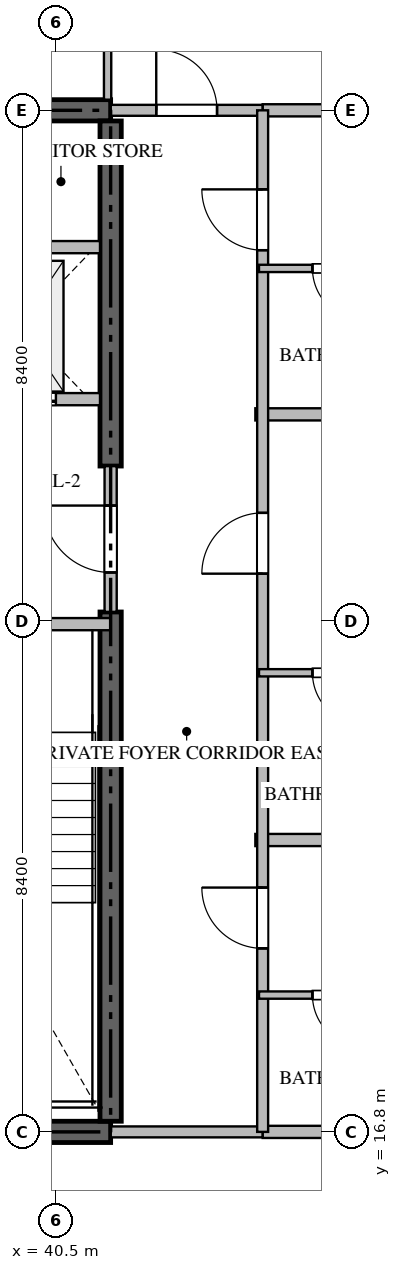
"""IFC4 building model, lengths in metres.
Left out: names, types, materials, properties, quantities, classifications, styles, units other than length and angle.
Written with IfcOpenShell. Run it as: python <this file> out.ifc"""

import sys

from ifc_helpers import new_model, si_unit, direction, frame, frame_2d, origin, place, context, subcontext, project, spatial, rectangle, extrude, source, transform, mapped, element, fill, save


model = new_model("IFC4")
c1 = context("Model", 3, precision=1e-05, world=origin(), true_north=direction((0.0, 1.0)))
c2 = subcontext(c1, "Body", "Model", "MODEL_VIEW")
j1 = project(units=[si_unit("LENGTHUNIT", "METRE"), si_unit("PLANEANGLEUNIT", "RADIAN")], contexts=[c1])
p1 = place(None, origin())
s1 = spatial("IfcSite", under=j1, at=p1, CompositionType="ELEMENT")
p2 = place(p1, origin())
s2 = spatial("IfcBuilding", under=s1, at=p2, CompositionType="ELEMENT")
p3 = place(p2, frame((0.0, 0.0, 256.65)))
s3 = spatial("IfcBuildingStorey", under=s2, at=p3, CompositionType="ELEMENT", Elevation=256.65)
for number, where, z_axis, x_axis in (
    (1, (23.4, 16.8, -0.26), (0.0, 0.0, 1.0), (1.0, 0.0, 0.0)),
    (2, (41.4, 33.6, -0.26), (0.0, 0.0, 1.0), (-1.0, 0.0, 0.0)),
):
    element("IfcWall", number, at=place(p3, frame(where, z_axis=z_axis, x_axis=x_axis)), inside=s3, PredefinedType="SHEAR", context=c2, shape_type="SweptSolid", body=[
        extrude(rectangle(XDim=18.0, YDim=0.35, at=frame_2d((9.0, 0.0))), origin(), (0.0, 0.0, 1.0), 3.848),
    ])
p4 = place(p3, frame((41.4, 16.975, -0.26), z_axis=(0.0, 0.0, 1.0), x_axis=(0.0, 1.0, 0.0)))
e3 = element("IfcWall", 3, at=p4, inside=s3, PredefinedType="SHEAR", context=c2, shape_type="SweptSolid", body=[
    extrude(rectangle(XDim=8.375, YDim=0.35, at=frame_2d((4.188, 0.0))), origin(), (0.0, 0.0, 1.0), 3.848),
])
p5 = place(p3, frame((41.4, 27.75, -0.26), z_axis=(0.0, 0.0, 1.0), x_axis=(0.0, 1.0, 0.0)))
e4 = element("IfcWall", 4, at=p5, inside=s3, PredefinedType="SHEAR", context=c2, shape_type="SweptSolid", body=[
    extrude(rectangle(XDim=5.675, YDim=0.35, at=frame_2d((2.837, 0.0))), origin(), (0.0, 0.0, 1.0), 3.848),
])
p6 = place(p3, frame((36.95, 25.15, 0.0), z_axis=(0.0, 0.0, 1.0), x_axis=(1.0, 0.0, 0.0)))
e5 = element("IfcWall", 5, at=p6, inside=s3, PredefinedType="STANDARD", context=c2, shape_type="SweptSolid", body=[
    extrude(rectangle(XDim=4.45, YDim=0.2, at=frame_2d((2.225, 0.0))), origin(), (0.0, 0.0, 1.0), 3.59),
])
p7 = place(p6, frame((1.65, 0.0, 0.0)))
e6 = element("IfcOpeningElement", 6, at=p7, cuts=e5, PredefinedType="OPENING", context=c2, shape_type="SweptSolid", body=[
    extrude(rectangle(XDim=1.1, YDim=2.15, at=frame_2d((0.55, 1.075))), frame((0.0, 0.11, 0.0), z_axis=(0.0, -1.0, 0.0), x_axis=(1.0, 0.0, 0.0)), (0.0, 0.0, 1.0), 0.22),
])
p8 = place(p3, frame((38.75, 28.85, 0.0), z_axis=(0.0, 0.0, 1.0), x_axis=(1.0, 0.0, 0.0)))
e7 = element("IfcWall", 7, at=p8, inside=s3, PredefinedType="STANDARD", context=c2, shape_type="SweptSolid", body=[
    extrude(rectangle(XDim=2.475, YDim=0.2, at=frame_2d((1.238, 0.0))), origin(), (0.0, 0.0, 1.0), 3.59),
])
p9 = place(p8, frame((0.55, 0.0, 0.0)))
e8 = element("IfcOpeningElement", 8, at=p9, cuts=e7, PredefinedType="OPENING", context=c2, shape_type="SweptSolid", body=[
    extrude(rectangle(XDim=1.2, YDim=2.2, at=frame_2d((0.6, 1.1))), frame((0.0, 0.11, 0.0), z_axis=(0.0, -1.0, 0.0), x_axis=(1.0, 0.0, 0.0)), (0.0, 0.0, 1.0), 0.22),
])
p10 = place(p3, frame((38.75, 31.35, 0.0), z_axis=(0.0, 0.0, 1.0), x_axis=(1.0, 0.0, 0.0)))
e9 = element("IfcWall", 9, at=p10, inside=s3, PredefinedType="STANDARD", context=c2, shape_type="SweptSolid", body=[
    extrude(rectangle(XDim=2.475, YDim=0.2, at=frame_2d((1.238, 0.0))), origin(), (0.0, 0.0, 1.0), 3.59),
])
p11 = place(p3, frame((41.4, 25.352, 0.0), z_axis=(0.0, 0.0, 1.0), x_axis=(0.0, 1.0, 0.0)))
e10 = element("IfcWall", 10, at=p11, inside=s3, PredefinedType="STANDARD", context=c2, shape_type="SweptSolid", body=[
    extrude(rectangle(XDim=2.396, YDim=0.2, at=frame_2d((1.198, 0.0))), origin(), (0.0, 0.0, 1.0), 3.59),
])
p12 = place(p11, frame((0.648, 0.0, 0.0)))
e11 = element("IfcOpeningElement", 11, at=p12, cuts=e10, PredefinedType="OPENING", context=c2, shape_type="SweptSolid", body=[
    extrude(rectangle(XDim=1.1, YDim=2.15, at=frame_2d((0.55, 1.075))), frame((0.0, 0.11, 0.0), z_axis=(0.0, -1.0, 0.0), x_axis=(1.0, 0.0, 0.0)), (0.0, 0.0, 1.0), 0.22),
])
for number, where, z_axis, x_axis in (
    (12, (43.78, 21.6, 0.0), (0.0, 0.0, 1.0), (1.0, 0.0, 0.0)),
    (13, (43.78, 28.6, 0.0), (0.0, 0.0, 1.0), (1.0, 0.0, 0.0)),
):
    element("IfcWall", number, at=place(p3, frame(where, z_axis=z_axis, x_axis=x_axis)), inside=s3, PredefinedType="PARTITIONING", context=c2, shape_type="SweptSolid", body=[
        extrude(rectangle(XDim=13.538, YDim=0.2, at=frame_2d((6.769, 0.0))), origin(), (0.0, 0.0, 1.0), 3.59),
    ])
for number, where, z_axis, x_axis in (
    (14, (43.9, 16.8, 0.0), (0.0, 0.0, 1.0), (1.0, 0.0, 0.0)),
    (15, (43.9, 33.6, 0.0), (0.0, 0.0, 1.0), (1.0, 0.0, 0.0)),
):
    element("IfcWall", number, at=place(p3, frame(where, z_axis=z_axis, x_axis=x_axis)), inside=s3, PredefinedType="PARTITIONING", context=c2, shape_type="SweptSolid", body=[
        extrude(rectangle(XDim=13.418, YDim=0.2, at=frame_2d((6.709, 0.0))), origin(), (0.0, 0.0, 1.0), 3.59),
    ])
p13 = place(p3, frame((41.402, 16.8, 0.0), z_axis=(0.0, 0.0, 1.0), x_axis=(1.0, 0.0, 0.0)))
e16 = element("IfcWall", 16, at=p13, inside=s3, PredefinedType="PARTITIONING", context=c2, shape_type="SweptSolid", body=[
    extrude(rectangle(XDim=2.496, YDim=0.18, at=frame_2d((1.248, 0.0))), origin(), (0.0, 0.0, 1.0), 3.59),
])
p14 = place(p3, frame((41.402, 33.6, 0.0), z_axis=(0.0, 0.0, 1.0), x_axis=(1.0, 0.0, 0.0)))
e17 = element("IfcWall", 17, at=p14, inside=s3, PredefinedType="PARTITIONING", context=c2, shape_type="SweptSolid", body=[
    extrude(rectangle(XDim=2.496, YDim=0.18, at=frame_2d((1.248, 0.0))), origin(), (0.0, 0.0, 1.0), 3.59),
])
p15 = place(p14, frame((0.748, 0.0, 0.0)))
e18 = element("IfcOpeningElement", 18, at=p15, cuts=e17, PredefinedType="OPENING", context=c2, shape_type="SweptSolid", body=[
    extrude(rectangle(XDim=1.0, YDim=2.15, at=frame_2d((0.5, 1.075))), frame((0.0, 0.1, 0.0), z_axis=(0.0, -1.0, 0.0), x_axis=(1.0, 0.0, 0.0)), (0.0, 0.0, 1.0), 0.2),
])
p16 = place(p3, frame((43.9, 16.8, 0.0), z_axis=(0.0, 0.0, 1.0), x_axis=(0.0, 1.0, 0.0)))
e19 = element("IfcWall", 19, at=p16, inside=s3, PredefinedType="PARTITIONING", context=c2, shape_type="SweptSolid", body=[
    extrude(rectangle(XDim=16.8, YDim=0.18, at=frame_2d((8.4, 0.0))), origin(), (0.0, 0.0, 1.0), 3.59),
])
p17 = place(p16, frame((3.018, 0.0, 0.0)))
e20 = element("IfcOpeningElement", 20, at=p17, cuts=e19, PredefinedType="OPENING", context=c2, shape_type="SweptSolid", body=[
    extrude(rectangle(XDim=1.0, YDim=2.15, at=frame_2d((0.5, 1.075))), frame((0.0, 0.1, 0.0), z_axis=(0.0, -1.0, 0.0), x_axis=(1.0, 0.0, 0.0)), (0.0, 0.0, 1.0), 0.2),
])
p18 = place(p16, frame((9.18, 0.0, 0.0)))
e21 = element("IfcOpeningElement", 21, at=p18, cuts=e19, PredefinedType="OPENING", context=c2, shape_type="SweptSolid", body=[
    extrude(rectangle(XDim=1.0, YDim=2.15, at=frame_2d((0.5, 1.075))), frame((0.0, 0.1, 0.0), z_axis=(0.0, -1.0, 0.0), x_axis=(1.0, 0.0, 0.0)), (0.0, 0.0, 1.0), 0.2),
])
p19 = place(p16, frame((14.5, 0.0, 0.0)))
e22 = element("IfcOpeningElement", 22, at=p19, cuts=e19, PredefinedType="OPENING", context=c2, shape_type="SweptSolid", body=[
    extrude(rectangle(XDim=1.0, YDim=2.15, at=frame_2d((0.5, 1.075))), frame((0.0, 0.1, 0.0), z_axis=(0.0, -1.0, 0.0), x_axis=(1.0, 0.0, 0.0)), (0.0, 0.0, 1.0), 0.2),
])
p20 = place(p3, frame((41.35, 36.35, 0.0), z_axis=(0.0, 0.0, 1.0), x_axis=(0.0, -1.0, 0.0)))
e23 = element("IfcWall", 23, at=p20, inside=s3, PredefinedType="PARTITIONING", context=c2, shape_type="SweptSolid", body=[
    extrude(rectangle(XDim=2.575, YDim=0.12, at=frame_2d((1.288, 0.0))), origin(), (0.0, 0.0, 1.0), 3.59),
])
p21 = place(p3, frame((46.448, 19.05, 0.0), z_axis=(0.0, 0.0, 1.0), x_axis=(-1.0, 0.0, 0.0)))
e24 = element("IfcWall", 24, at=p21, inside=s3, PredefinedType="PARTITIONING", context=c2, shape_type="SweptSolid", body=[
    extrude(rectangle(XDim=2.608, YDim=0.12, at=frame_2d((1.304, 0.0))), origin(), (0.0, 0.0, 1.0), 3.59),
])
p22 = place(p21, frame((0.879, 0.0, 0.0)))
e25 = element("IfcOpeningElement", 25, at=p22, cuts=e24, PredefinedType="OPENING", context=c2, shape_type="SweptSolid", body=[
    extrude(rectangle(XDim=0.85, YDim=2.1, at=frame_2d((0.425, 1.05))), frame((0.0, 0.07, 0.0), z_axis=(0.0, -1.0, 0.0), x_axis=(1.0, 0.0, 0.0)), (0.0, 0.0, 1.0), 0.14),
])
p23 = place(p3, frame((46.448, 24.35, 0.0), z_axis=(0.0, 0.0, 1.0), x_axis=(-1.0, 0.0, 0.0)))
e26 = element("IfcWall", 26, at=p23, inside=s3, PredefinedType="PARTITIONING", context=c2, shape_type="SweptSolid", body=[
    extrude(rectangle(XDim=2.608, YDim=0.12, at=frame_2d((1.304, 0.0))), origin(), (0.0, 0.0, 1.0), 3.59),
])
p24 = place(p23, frame((0.879, 0.0, 0.0)))
e27 = element("IfcOpeningElement", 27, at=p24, cuts=e26, PredefinedType="OPENING", context=c2, shape_type="SweptSolid", body=[
    extrude(rectangle(XDim=0.85, YDim=2.1, at=frame_2d((0.425, 1.05))), frame((0.0, 0.07, 0.0), z_axis=(0.0, -1.0, 0.0), x_axis=(1.0, 0.0, 0.0)), (0.0, 0.0, 1.0), 0.14),
])
p25 = place(p3, frame((46.448, 31.0, 0.0), z_axis=(0.0, 0.0, 1.0), x_axis=(-1.0, 0.0, 0.0)))
e28 = element("IfcWall", 28, at=p25, inside=s3, PredefinedType="PARTITIONING", context=c2, shape_type="SweptSolid", body=[
    extrude(rectangle(XDim=2.608, YDim=0.12, at=frame_2d((1.304, 0.0))), origin(), (0.0, 0.0, 1.0), 3.59),
])
p26 = place(p25, frame((0.879, 0.0, 0.0)))
e29 = element("IfcOpeningElement", 29, at=p26, cuts=e28, PredefinedType="OPENING", context=c2, shape_type="SweptSolid", body=[
    extrude(rectangle(XDim=0.85, YDim=2.1, at=frame_2d((0.425, 1.05))), frame((0.0, 0.07, 0.0), z_axis=(0.0, -1.0, 0.0), x_axis=(1.0, 0.0, 0.0)), (0.0, 0.0, 1.0), 0.14),
])
m1 = source(origin(), c2, "Body", "SweptSolid", [
    extrude(rectangle(XDim=1.2, YDim=2.2, at=frame_2d((0.6, 1.1))), frame((0.0, 0.025, 0.0), z_axis=(0.0, -1.0, 0.0), x_axis=(1.0, 0.0, 0.0)), (0.0, 0.0, 1.0), 0.05),
])
p27 = place(p9, origin())
e30 = element("IfcDoor", 30, at=p27, inside=s3, OperationType="DOUBLE_DOOR_SLIDING", PredefinedType="DOOR", context=c2, shape_type="MappedRepresentation", body=[
    mapped(m1, transform((0.0, 0.0, 0.0), scale=1.0)),
])
fill(e8, e30)
m2 = source(origin(), c2, "Body", "SweptSolid", [
    extrude(rectangle(XDim=1.1, YDim=2.15, at=frame_2d((0.55, 1.075))), frame((0.0, 0.025, 0.0), z_axis=(0.0, -1.0, 0.0), x_axis=(1.0, 0.0, 0.0)), (0.0, 0.0, 1.0), 0.05),
])
p28 = place(p12, origin())
e31 = element("IfcDoor", 31, at=p28, inside=s3, OperationType="SINGLE_SWING_RIGHT", PredefinedType="DOOR", context=c2, shape_type="MappedRepresentation", body=[
    mapped(m2, transform((0.0, 0.0, 0.0), scale=1.0)),
])
fill(e11, e31)
m3 = source(origin(), c2, "Body", "SweptSolid", [
    extrude(rectangle(XDim=1.0, YDim=2.15, at=frame_2d((0.5, 1.075))), frame((0.0, 0.025, 0.0), z_axis=(0.0, -1.0, 0.0), x_axis=(1.0, 0.0, 0.0)), (0.0, 0.0, 1.0), 0.05),
])
p29 = place(p15, origin())
e32 = element("IfcDoor", 32, at=p29, inside=s3, OperationType="SINGLE_SWING_LEFT", PredefinedType="DOOR", context=c2, shape_type="MappedRepresentation", body=[
    mapped(m3, transform((0.0, 0.0, 0.0), scale=1.0)),
])
fill(e18, e32)
p30 = place(p17, origin())
e33 = element("IfcDoor", 33, at=p30, inside=s3, OperationType="SINGLE_SWING_RIGHT", PredefinedType="DOOR", context=c2, shape_type="MappedRepresentation", body=[
    mapped(m3, transform((0.0, 0.0, 0.0), scale=1.0)),
])
fill(e20, e33)
p31 = place(p18, origin())
e34 = element("IfcDoor", 34, at=p31, inside=s3, OperationType="SINGLE_SWING_LEFT", PredefinedType="DOOR", context=c2, shape_type="MappedRepresentation", body=[
    mapped(m3, transform((0.0, 0.0, 0.0), scale=1.0)),
])
fill(e21, e34)
p32 = place(p19, origin())
e35 = element("IfcDoor", 35, at=p32, inside=s3, OperationType="SINGLE_SWING_RIGHT", PredefinedType="DOOR", context=c2, shape_type="MappedRepresentation", body=[
    mapped(m3, transform((0.0, 0.0, 0.0), scale=1.0)),
])
fill(e22, e35)
m4 = source(origin(), c2, "Body", "SweptSolid", [
    extrude(rectangle(XDim=0.85, YDim=2.1, at=frame_2d((0.425, 1.05))), frame((0.0, 0.025, 0.0), z_axis=(0.0, -1.0, 0.0), x_axis=(1.0, 0.0, 0.0)), (0.0, 0.0, 1.0), 0.05),
])
p33 = place(p22, origin())
e36 = element("IfcDoor", 36, at=p33, inside=s3, OperationType="SINGLE_SWING_LEFT", PredefinedType="DOOR", context=c2, shape_type="MappedRepresentation", body=[
    mapped(m4, transform((0.0, 0.0, 0.0), scale=1.0)),
])
fill(e25, e36)
p34 = place(p24, origin())
e37 = element("IfcDoor", 37, at=p34, inside=s3, OperationType="SINGLE_SWING_LEFT", PredefinedType="DOOR", context=c2, shape_type="MappedRepresentation", body=[
    mapped(m4, transform((0.0, 0.0, 0.0), scale=1.0)),
])
fill(e27, e37)
p35 = place(p26, origin())
e38 = element("IfcDoor", 38, at=p35, inside=s3, OperationType="SINGLE_SWING_LEFT", PredefinedType="DOOR", context=c2, shape_type="MappedRepresentation", body=[
    mapped(m4, transform((0.0, 0.0, 0.0), scale=1.0)),
])
fill(e29, e38)
save(model, sys.argv[1])
